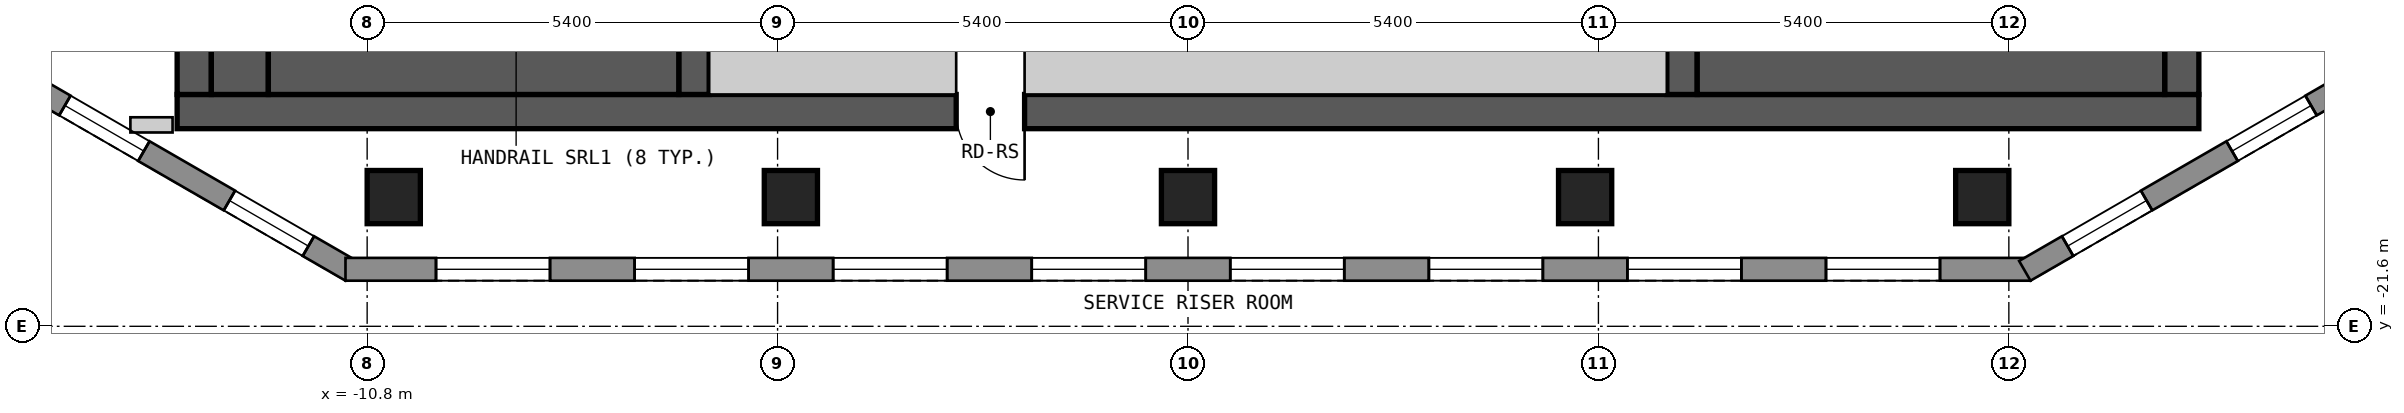
"""IFC4 building model, lengths in metres.
Left out: names, types, materials, properties, quantities, classifications, styles, units other than length and angle.
Written with IfcOpenShell. Run it as: python <this file> out.ifc"""

import sys

from ifc_helpers import new_model, si_unit, direction, frame, frame_2d, origin, origin_2d, place, context, subcontext, project, spatial, polyline, rectangle, outline, extrude, element, fill, save


model = new_model("IFC4")
c1 = context("Model", 3, precision=1e-05, world=origin(), true_north=direction((0.0, 1.0)))
c2 = subcontext(c1, "Body", "Model", "MODEL_VIEW")
j1 = project(units=[si_unit("LENGTHUNIT", "METRE"), si_unit("PLANEANGLEUNIT", "RADIAN")], contexts=[c1])
p1 = place(None, origin())
s1 = spatial("IfcSite", under=j1, at=p1, CompositionType="ELEMENT")
p2 = place(p1, origin())
s2 = spatial("IfcBuilding", under=s1, at=p2, CompositionType="ELEMENT")
p3 = place(p2, frame((0.0, 0.0, 208.8)))
s3 = spatial("IfcBuildingStorey", under=s2, at=p3, CompositionType="ELEMENT", Elevation=208.8)
for number, where, z_axis, x_axis in (
    (1, (-10.45, -19.9, 0.0), (0.0, 0.0, 1.0), (1.0, 0.0, 0.0)),
    (2, (-5.225, -19.9, 0.0), (0.0, 0.0, 1.0), (1.0, 0.0, 0.0)),
    (3, (0.0, -19.9, 0.0), (0.0, 0.0, 1.0), (1.0, 0.0, 0.0)),
    (4, (5.225, -19.9, 0.0), (0.0, 0.0, 1.0), (1.0, 0.0, 0.0)),
    (5, (10.45, -19.9, 0.0), (0.0, 0.0, 1.0), (1.0, 0.0, 0.0)),
):
    element("IfcColumn", number, at=place(p3, frame(where, z_axis=z_axis, x_axis=x_axis)), inside=s3, PredefinedType="COLUMN", context=c2, shape_type="SweptSolid", body=[
        extrude(rectangle(XDim=0.7, YDim=0.7, at=origin_2d()), origin(), (0.0, 0.0, 1.0), 3.0),
    ])
p4 = place(p3, frame((-13.3, -18.775, 0.0), z_axis=(0.0, 0.0, 1.0), x_axis=(1.0, 0.0, 0.0)))
e6 = element("IfcWall", 6, at=p4, inside=s3, PredefinedType="SHEAR", context=c2, shape_type="SweptSolid", body=[
    extrude(rectangle(XDim=26.6, YDim=0.45, at=frame_2d((13.3, 0.0))), origin(), (0.0, 0.0, 1.0), 2.7),
])
p5 = place(p4, frame((10.25, 0.0, 0.0)))
e7 = element("IfcOpeningElement", 7, at=p5, cuts=e6, PredefinedType="OPENING", context=c2, shape_type="SweptSolid", body=[
    extrude(rectangle(XDim=0.9, YDim=2.1, at=frame_2d((0.45, 1.05))), frame((0.0, 0.235, 0.0), z_axis=(0.0, -1.0, 0.0), x_axis=(1.0, 0.0, 0.0)), (0.0, 0.0, 1.0), 0.47),
])
p6 = place(p3, frame((-13.075, -18.55, 0.0), z_axis=(0.0, 0.0, 1.0), x_axis=(0.0, 1.0, 0.0)))
e8 = element("IfcWall", 8, at=p6, inside=s3, PredefinedType="SHEAR", context=c2, shape_type="SweptSolid", body=[
    extrude(rectangle(XDim=13.1, YDim=0.45, at=frame_2d((6.55, 0.0))), origin(), (0.0, 0.0, 1.0), 2.7),
])
p7 = place(p6, frame((4.35, 0.0, 0.0)))
e9 = element("IfcOpeningElement", 9, at=p7, cuts=e8, PredefinedType="OPENING", context=c2, shape_type="SweptSolid", body=[
    extrude(rectangle(XDim=1.2, YDim=2.1, at=frame_2d((0.6, 1.05))), frame((0.0, 0.235, 0.0), z_axis=(0.0, -1.0, 0.0), x_axis=(1.0, 0.0, 0.0)), (0.0, 0.0, 1.0), 0.47),
])
p8 = place(p3, frame((13.075, -18.55, 0.0), z_axis=(0.0, 0.0, 1.0), x_axis=(0.0, 1.0, 0.0)))
e10 = element("IfcWall", 10, at=p8, inside=s3, PredefinedType="SHEAR", context=c2, shape_type="SweptSolid", body=[
    extrude(rectangle(XDim=13.1, YDim=0.45, at=frame_2d((6.55, 0.0))), origin(), (0.0, 0.0, 1.0), 2.7),
])
for number, where, z_axis, x_axis in (
    (11, (-6.5, -18.55, 0.0), (0.0, 0.0, 1.0), (0.0, 1.0, 0.0)),
    (12, (6.5, -18.55, 0.0), (0.0, 0.0, 1.0), (0.0, 1.0, 0.0)),
):
    element("IfcWall", number, at=place(p3, frame(where, z_axis=z_axis, x_axis=x_axis)), inside=s3, PredefinedType="SHEAR", context=c2, shape_type="SweptSolid", body=[
        extrude(rectangle(XDim=3.7, YDim=0.4, at=frame_2d((1.85, 0.0))), origin(), (0.0, 0.0, 1.0), 2.7),
    ])
p9 = place(p3, frame((-15.34, -18.37, 0.0), z_axis=(0.0, 0.0, 1.0), x_axis=(0.866022959057, -0.500004234368, 0.0)))
e13 = element("IfcWall", 13, at=p9, inside=s3, PredefinedType="SOLIDWALL", context=c2, shape_type="SweptSolid", body=[
    extrude(outline(polyline([(0.0, -0.15), (5.0, -0.15), (4.92, 0.15), (0.08, 0.15), (0.0, -0.15)])), origin(), (0.0, 0.0, 1.0), 2.7),
])
p10 = place(p9, frame((0.65, 0.0, 0.15)))
e14 = element("IfcOpeningElement", 14, at=p10, cuts=e13, PredefinedType="OPENING", context=c2, shape_type="SweptSolid", body=[
    extrude(rectangle(XDim=1.2, YDim=2.1, at=frame_2d((0.6, 1.05))), frame((0.0, 0.16, 0.0), z_axis=(0.0, -1.0, 0.0), x_axis=(1.0, 0.0, 0.0)), (0.0, 0.0, 1.0), 0.32),
])
p11 = place(p9, frame((3.15, 0.0, 0.15)))
e15 = element("IfcOpeningElement", 15, at=p11, cuts=e13, PredefinedType="OPENING", context=c2, shape_type="SweptSolid", body=[
    extrude(rectangle(XDim=1.2, YDim=2.1, at=frame_2d((0.6, 1.05))), frame((0.0, 0.16, 0.0), z_axis=(0.0, -1.0, 0.0), x_axis=(1.0, 0.0, 0.0)), (0.0, 0.0, 1.0), 0.32),
])
p12 = place(p3, frame((-11.085, -20.85, 0.0), z_axis=(0.0, 0.0, 1.0), x_axis=(1.0, 0.0, 0.0)))
e16 = element("IfcWall", 16, at=p12, inside=s3, PredefinedType="SOLIDWALL", context=c2, shape_type="SweptSolid", body=[
    extrude(outline(polyline([(0.0, -0.15), (22.17, -0.15), (22.09, 0.15), (0.08, 0.15), (0.0, -0.15)])), origin(), (0.0, 0.0, 1.0), 2.7),
])
p13 = place(p12, frame((1.191, 0.0, 0.15)))
e17 = element("IfcOpeningElement", 17, at=p13, cuts=e16, PredefinedType="OPENING", context=c2, shape_type="SweptSolid", body=[
    extrude(rectangle(XDim=1.5, YDim=2.1, at=frame_2d((0.75, 1.05))), frame((0.0, 0.16, 0.0), z_axis=(0.0, -1.0, 0.0), x_axis=(1.0, 0.0, 0.0)), (0.0, 0.0, 1.0), 0.32),
])
p14 = place(p12, frame((3.804, 0.0, 0.15)))
e18 = element("IfcOpeningElement", 18, at=p14, cuts=e16, PredefinedType="OPENING", context=c2, shape_type="SweptSolid", body=[
    extrude(rectangle(XDim=1.5, YDim=2.1, at=frame_2d((0.75, 1.05))), frame((0.0, 0.16, 0.0), z_axis=(0.0, -1.0, 0.0), x_axis=(1.0, 0.0, 0.0)), (0.0, 0.0, 1.0), 0.32),
])
p15 = place(p12, frame((6.416, 0.0, 0.15)))
e19 = element("IfcOpeningElement", 19, at=p15, cuts=e16, PredefinedType="OPENING", context=c2, shape_type="SweptSolid", body=[
    extrude(rectangle(XDim=1.5, YDim=2.1, at=frame_2d((0.75, 1.05))), frame((0.0, 0.16, 0.0), z_axis=(0.0, -1.0, 0.0), x_axis=(1.0, 0.0, 0.0)), (0.0, 0.0, 1.0), 0.32),
])
p16 = place(p12, frame((9.029, 0.0, 0.15)))
e20 = element("IfcOpeningElement", 20, at=p16, cuts=e16, PredefinedType="OPENING", context=c2, shape_type="SweptSolid", body=[
    extrude(rectangle(XDim=1.5, YDim=2.1, at=frame_2d((0.75, 1.05))), frame((0.0, 0.16, 0.0), z_axis=(0.0, -1.0, 0.0), x_axis=(1.0, 0.0, 0.0)), (0.0, 0.0, 1.0), 0.32),
])
p17 = place(p12, frame((11.641, 0.0, 0.15)))
e21 = element("IfcOpeningElement", 21, at=p17, cuts=e16, PredefinedType="OPENING", context=c2, shape_type="SweptSolid", body=[
    extrude(rectangle(XDim=1.5, YDim=2.1, at=frame_2d((0.75, 1.05))), frame((0.0, 0.16, 0.0), z_axis=(0.0, -1.0, 0.0), x_axis=(1.0, 0.0, 0.0)), (0.0, 0.0, 1.0), 0.32),
])
p18 = place(p12, frame((14.254, 0.0, 0.15)))
e22 = element("IfcOpeningElement", 22, at=p18, cuts=e16, PredefinedType="OPENING", context=c2, shape_type="SweptSolid", body=[
    extrude(rectangle(XDim=1.5, YDim=2.1, at=frame_2d((0.75, 1.05))), frame((0.0, 0.16, 0.0), z_axis=(0.0, -1.0, 0.0), x_axis=(1.0, 0.0, 0.0)), (0.0, 0.0, 1.0), 0.32),
])
p19 = place(p12, frame((16.866, 0.0, 0.15)))
e23 = element("IfcOpeningElement", 23, at=p19, cuts=e16, PredefinedType="OPENING", context=c2, shape_type="SweptSolid", body=[
    extrude(rectangle(XDim=1.5, YDim=2.1, at=frame_2d((0.75, 1.05))), frame((0.0, 0.16, 0.0), z_axis=(0.0, -1.0, 0.0), x_axis=(1.0, 0.0, 0.0)), (0.0, 0.0, 1.0), 0.32),
])
p20 = place(p12, frame((19.479, 0.0, 0.15)))
e24 = element("IfcOpeningElement", 24, at=p20, cuts=e16, PredefinedType="OPENING", context=c2, shape_type="SweptSolid", body=[
    extrude(rectangle(XDim=1.5, YDim=2.1, at=frame_2d((0.75, 1.05))), frame((0.0, 0.16, 0.0), z_axis=(0.0, -1.0, 0.0), x_axis=(1.0, 0.0, 0.0)), (0.0, 0.0, 1.0), 0.32),
])
p21 = place(p3, frame((11.01, -20.87, 0.0), z_axis=(0.0, 0.0, 1.0), x_axis=(0.866022959057, 0.500004234368, 0.0)))
e25 = element("IfcWall", 25, at=p21, inside=s3, PredefinedType="SOLIDWALL", context=c2, shape_type="SweptSolid", body=[
    extrude(outline(polyline([(0.0, -0.15), (5.0, -0.15), (4.92, 0.15), (0.08, 0.15), (0.0, -0.15)])), origin(), (0.0, 0.0, 1.0), 2.7),
])
p22 = place(p21, frame((0.65, 0.0, 0.15)))
e26 = element("IfcOpeningElement", 26, at=p22, cuts=e25, PredefinedType="OPENING", context=c2, shape_type="SweptSolid", body=[
    extrude(rectangle(XDim=1.2, YDim=2.1, at=frame_2d((0.6, 1.05))), frame((0.0, 0.16, 0.0), z_axis=(0.0, -1.0, 0.0), x_axis=(1.0, 0.0, 0.0)), (0.0, 0.0, 1.0), 0.32),
])
p23 = place(p21, frame((3.149, 0.0, 0.15)))
e27 = element("IfcOpeningElement", 27, at=p23, cuts=e25, PredefinedType="OPENING", context=c2, shape_type="SweptSolid", body=[
    extrude(rectangle(XDim=1.2, YDim=2.1, at=frame_2d((0.6, 1.05))), frame((0.0, 0.16, 0.0), z_axis=(0.0, -1.0, 0.0), x_axis=(1.0, 0.0, 0.0)), (0.0, 0.0, 1.0), 0.32),
])
p24 = place(p3, frame((-13.915, -18.95, 0.0), z_axis=(0.0, 0.0, 1.0), x_axis=(1.0, 0.0, 0.0)))
e28 = element("IfcWall", 28, at=p24, inside=s3, PredefinedType="PARTITIONING", context=c2, shape_type="SweptSolid", body=[
    extrude(rectangle(XDim=0.555, YDim=0.2, at=frame_2d((0.277, 0.0))), origin(), (0.0, 0.0, 1.0), 2.7),
])
p25 = place(p3, frame((-12.475, -18.55, 0.0), z_axis=(0.0, 0.0, 1.0), x_axis=(0.0, 1.0, 0.0)))
e29 = element("IfcWall", 29, at=p25, inside=s3, PredefinedType="SOLIDWALL", context=c2, shape_type="SweptSolid", body=[
    extrude(rectangle(XDim=3.7, YDim=0.75, at=frame_2d((1.85, 0.0))), origin(), (0.0, 0.0, 1.0), 2.7),
])
p26 = place(p3, frame((-12.1, -18.175, 0.0), z_axis=(0.0, 0.0, 1.0), x_axis=(1.0, 0.0, 0.0)))
e30 = element("IfcWall", 30, at=p26, inside=s3, PredefinedType="SOLIDWALL", context=c2, shape_type="SweptSolid", body=[
    extrude(rectangle(XDim=5.4, YDim=0.75, at=frame_2d((2.7, 0.0))), origin(), (0.0, 0.0, 1.0), 2.7),
])
p27 = place(p3, frame((-6.3, -18.175, 0.0), z_axis=(0.0, 0.0, 1.0), x_axis=(1.0, 0.0, 0.0)))
e31 = element("IfcWall", 31, at=p27, inside=s3, PredefinedType="PARTITIONING", context=c2, shape_type="SweptSolid", body=[
    extrude(rectangle(XDim=3.25, YDim=0.75, at=frame_2d((1.625, 0.0))), origin(), (0.0, 0.0, 1.0), 2.7),
])
p28 = place(p3, frame((-2.15, -18.175, 0.0), z_axis=(0.0, 0.0, 1.0), x_axis=(1.0, 0.0, 0.0)))
e32 = element("IfcWall", 32, at=p28, inside=s3, PredefinedType="PARTITIONING", context=c2, shape_type="SweptSolid", body=[
    extrude(rectangle(XDim=8.45, YDim=0.75, at=frame_2d((4.225, 0.0))), origin(), (0.0, 0.0, 1.0), 2.7),
])
p29 = place(p3, frame((6.7, -18.075, 0.0), z_axis=(0.0, 0.0, 1.0), x_axis=(1.0, 0.0, 0.0)))
e33 = element("IfcWall", 33, at=p29, inside=s3, PredefinedType="SOLIDWALL", context=c2, shape_type="SweptSolid", body=[
    extrude(rectangle(XDim=6.15, YDim=0.95, at=frame_2d((3.075, 0.0))), origin(), (0.0, 0.0, 1.0), 2.7),
])
p30 = place(p10, origin())
e34 = element("IfcWindow", 34, at=p30, inside=s3, PartitioningType="SINGLE_PANEL", PredefinedType="WINDOW", context=c2, shape_type="SweptSolid", body=[
    extrude(rectangle(XDim=1.2, YDim=2.1, at=frame_2d((0.6, 1.05))), frame((0.0, 0.03, 0.0), z_axis=(0.0, -1.0, 0.0), x_axis=(1.0, 0.0, 0.0)), (0.0, 0.0, 1.0), 0.06),
])
fill(e14, e34)
p31 = place(p11, origin())
e35 = element("IfcWindow", 35, at=p31, inside=s3, PartitioningType="SINGLE_PANEL", PredefinedType="WINDOW", context=c2, shape_type="SweptSolid", body=[
    extrude(rectangle(XDim=1.2, YDim=2.1, at=frame_2d((0.6, 1.05))), frame((0.0, 0.03, 0.0), z_axis=(0.0, -1.0, 0.0), x_axis=(1.0, 0.0, 0.0)), (0.0, 0.0, 1.0), 0.06),
])
fill(e15, e35)
p32 = place(p13, origin())
e36 = element("IfcWindow", 36, at=p32, inside=s3, PartitioningType="SINGLE_PANEL", PredefinedType="WINDOW", context=c2, shape_type="SweptSolid", body=[
    extrude(rectangle(XDim=1.5, YDim=2.1, at=frame_2d((0.75, 1.05))), frame((0.0, 0.03, 0.0), z_axis=(0.0, -1.0, 0.0), x_axis=(1.0, 0.0, 0.0)), (0.0, 0.0, 1.0), 0.06),
])
fill(e17, e36)
p33 = place(p14, origin())
e37 = element("IfcWindow", 37, at=p33, inside=s3, PartitioningType="SINGLE_PANEL", PredefinedType="WINDOW", context=c2, shape_type="SweptSolid", body=[
    extrude(rectangle(XDim=1.5, YDim=2.1, at=frame_2d((0.75, 1.05))), frame((0.0, 0.03, 0.0), z_axis=(0.0, -1.0, 0.0), x_axis=(1.0, 0.0, 0.0)), (0.0, 0.0, 1.0), 0.06),
])
fill(e18, e37)
p34 = place(p15, origin())
e38 = element("IfcWindow", 38, at=p34, inside=s3, PartitioningType="SINGLE_PANEL", PredefinedType="WINDOW", context=c2, shape_type="SweptSolid", body=[
    extrude(rectangle(XDim=1.5, YDim=2.1, at=frame_2d((0.75, 1.05))), frame((0.0, 0.03, 0.0), z_axis=(0.0, -1.0, 0.0), x_axis=(1.0, 0.0, 0.0)), (0.0, 0.0, 1.0), 0.06),
])
fill(e19, e38)
p35 = place(p16, origin())
e39 = element("IfcWindow", 39, at=p35, inside=s3, PartitioningType="SINGLE_PANEL", PredefinedType="WINDOW", context=c2, shape_type="SweptSolid", body=[
    extrude(rectangle(XDim=1.5, YDim=2.1, at=frame_2d((0.75, 1.05))), frame((0.0, 0.03, 0.0), z_axis=(0.0, -1.0, 0.0), x_axis=(1.0, 0.0, 0.0)), (0.0, 0.0, 1.0), 0.06),
])
fill(e20, e39)
p36 = place(p17, origin())
e40 = element("IfcWindow", 40, at=p36, inside=s3, PartitioningType="SINGLE_PANEL", PredefinedType="WINDOW", context=c2, shape_type="SweptSolid", body=[
    extrude(rectangle(XDim=1.5, YDim=2.1, at=frame_2d((0.75, 1.05))), frame((0.0, 0.03, 0.0), z_axis=(0.0, -1.0, 0.0), x_axis=(1.0, 0.0, 0.0)), (0.0, 0.0, 1.0), 0.06),
])
fill(e21, e40)
p37 = place(p18, origin())
e41 = element("IfcWindow", 41, at=p37, inside=s3, PartitioningType="SINGLE_PANEL", PredefinedType="WINDOW", context=c2, shape_type="SweptSolid", body=[
    extrude(rectangle(XDim=1.5, YDim=2.1, at=frame_2d((0.75, 1.05))), frame((0.0, 0.03, 0.0), z_axis=(0.0, -1.0, 0.0), x_axis=(1.0, 0.0, 0.0)), (0.0, 0.0, 1.0), 0.06),
])
fill(e22, e41)
p38 = place(p19, origin())
e42 = element("IfcWindow", 42, at=p38, inside=s3, PartitioningType="SINGLE_PANEL", PredefinedType="WINDOW", context=c2, shape_type="SweptSolid", body=[
    extrude(rectangle(XDim=1.5, YDim=2.1, at=frame_2d((0.75, 1.05))), frame((0.0, 0.03, 0.0), z_axis=(0.0, -1.0, 0.0), x_axis=(1.0, 0.0, 0.0)), (0.0, 0.0, 1.0), 0.06),
])
fill(e23, e42)
p39 = place(p20, origin())
e43 = element("IfcWindow", 43, at=p39, inside=s3, PartitioningType="SINGLE_PANEL", PredefinedType="WINDOW", context=c2, shape_type="SweptSolid", body=[
    extrude(rectangle(XDim=1.5, YDim=2.1, at=frame_2d((0.75, 1.05))), frame((0.0, 0.03, 0.0), z_axis=(0.0, -1.0, 0.0), x_axis=(1.0, 0.0, 0.0)), (0.0, 0.0, 1.0), 0.06),
])
fill(e24, e43)
p40 = place(p22, origin())
e44 = element("IfcWindow", 44, at=p40, inside=s3, PartitioningType="SINGLE_PANEL", PredefinedType="WINDOW", context=c2, shape_type="SweptSolid", body=[
    extrude(rectangle(XDim=1.2, YDim=2.1, at=frame_2d((0.6, 1.05))), frame((0.0, 0.03, 0.0), z_axis=(0.0, -1.0, 0.0), x_axis=(1.0, 0.0, 0.0)), (0.0, 0.0, 1.0), 0.06),
])
fill(e26, e44)
p41 = place(p23, origin())
e45 = element("IfcWindow", 45, at=p41, inside=s3, PartitioningType="SINGLE_PANEL", PredefinedType="WINDOW", context=c2, shape_type="SweptSolid", body=[
    extrude(rectangle(XDim=1.2, YDim=2.1, at=frame_2d((0.6, 1.05))), frame((0.0, 0.03, 0.0), z_axis=(0.0, -1.0, 0.0), x_axis=(1.0, 0.0, 0.0)), (0.0, 0.0, 1.0), 0.06),
])
fill(e27, e45)
p42 = place(p5, origin())
e46 = element("IfcDoor", 46, at=p42, inside=s3, OperationType="SINGLE_SWING_RIGHT", PredefinedType="DOOR", context=c2, shape_type="SweptSolid", body=[
    extrude(rectangle(XDim=0.9, YDim=2.1, at=frame_2d((0.45, 1.05))), frame((0.0, 0.025, 0.0), z_axis=(0.0, -1.0, 0.0), x_axis=(1.0, 0.0, 0.0)), (0.0, 0.0, 1.0), 0.05),
])
fill(e7, e46)
save(model, sys.argv[1])
